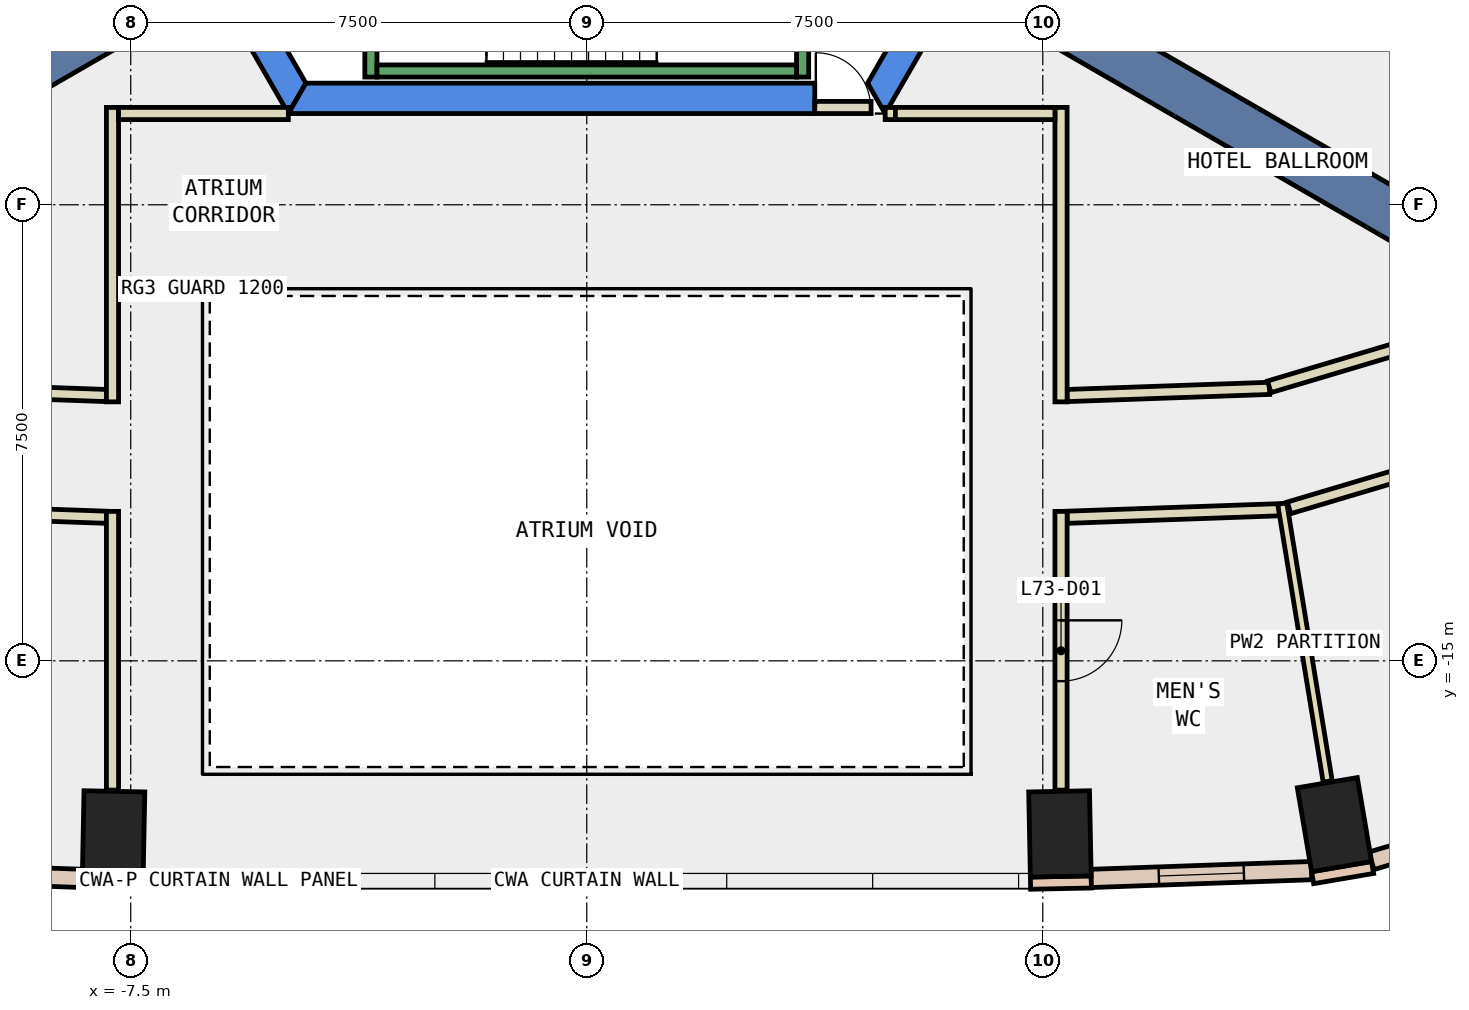
"""IFC4 building model, lengths in metres.
Left out: names, types, materials, properties, quantities, classifications, styles, units other than length and angle.
Written with IfcOpenShell. Run it as: python <this file> out.ifc"""

import sys

from ifc_helpers import new_model, si_unit, direction, frame, frame_2d, origin, origin_2d, place, context, subcontext, project, spatial, polyline, rectangle, outline, extrude, element, fill, save


model = new_model("IFC4")
c1 = context("Model", 3, precision=1e-05, world=origin(), true_north=direction((0.0, 1.0)))
c2 = subcontext(c1, "Body", "Model", "MODEL_VIEW")
j1 = project(units=[si_unit("LENGTHUNIT", "METRE"), si_unit("PLANEANGLEUNIT", "RADIAN")], contexts=[c1])
p1 = place(None, origin())
s1 = spatial("IfcSite", under=j1, at=p1, CompositionType="ELEMENT")
p2 = place(p1, origin())
s2 = spatial("IfcBuilding", under=s1, at=p2, CompositionType="ELEMENT")
p3 = place(p2, frame((0.0, 0.0, 311.6)))
s3 = spatial("IfcBuildingStorey", under=s2, at=p3, CompositionType="ELEMENT", Elevation=311.6)
for number, where, z_axis, x_axis in (
    (1, (-7.782, -17.846, -0.34), (0.0, 0.0, 1.0), (-1.0, 0.02, 0.0)),
    (2, (7.782, -17.846, -0.34), (0.0, 0.0, 1.0), (1.0, 0.02, 0.0)),
    (3, (12.297, -17.694, -0.34), (0.0, 0.0, 1.0), (0.986, 0.168, 0.0)),
):
    element("IfcColumn", number, at=place(p3, frame(where, z_axis=z_axis, x_axis=x_axis)), inside=s3, PredefinedType="COLUMN", context=c2, shape_type="SweptSolid", body=[
        extrude(rectangle(XDim=1.0, YDim=1.4, at=origin_2d()), origin(), (0.0, 0.0, 1.0), 3.6),
    ])
p4 = place(p3, frame((0.0, 0.0, -0.34)))
e4 = element("IfcWall", 4, at=p4, inside=s3, PredefinedType="SHEAR", context=c2, shape_type="SweptSolid", body=[
    extrude(outline(polyline([(-9.815, 2.5), (-4.907, -6.0), (-4.619, -5.5), (-9.238, 2.5), (-9.815, 2.5)])), origin(), (0.0, 0.0, 1.0), 3.6),
])
p5 = place(p3, frame((0.0, 0.0, -0.34)))
e5 = element("IfcWall", 5, at=p5, inside=s3, PredefinedType="SHEAR", context=c2, shape_type="SweptSolid", body=[
    extrude(outline(polyline([(3.75, -6.0), (3.75, -5.5), (-4.619, -5.5), (-4.907, -6.0), (3.75, -6.0)])), origin(), (0.0, 0.0, 1.0), 3.6),
])
p6 = place(p3, frame((0.0, 0.0, -0.34)))
e6 = element("IfcWall", 6, at=p6, inside=s3, PredefinedType="SHEAR", context=c2, shape_type="SweptSolid", body=[
    extrude(outline(polyline([(4.907, -6.0), (9.815, 2.5), (9.238, 2.5), (4.619, -5.5), (4.907, -6.0)])), origin(), (0.0, 0.0, 1.0), 3.6),
])
for number, where, z_axis, x_axis in (
    (7, (6.279, -3.625, -0.34), (0.0, 0.0, 1.0), (0.866, -0.5, 0.0)),
    (8, (-6.279, -3.625, -0.34), (0.0, 0.0, 1.0), (-0.866, -0.5, 0.0)),
):
    element("IfcWall", number, at=place(p3, frame(where, z_axis=z_axis, x_axis=x_axis)), inside=s3, PredefinedType="SHEAR", context=c2, shape_type="SweptSolid", body=[
        extrude(rectangle(XDim=9.0, YDim=0.8, at=frame_2d((4.5, 0.0))), origin(), (0.0, 0.0, 1.0), 3.6),
    ])
for number, where, z_axis, x_axis in (
    (9, (-8.298, -18.636, 0.0), (0.0, 0.0, 1.0), (1.0, -0.02, 0.0)),
    (10, (7.298, -18.656, 0.0), (0.0, 0.0, 1.0), (1.0, 0.02, 0.0)),
    (11, (11.938, -18.566, 0.0), (0.0, 0.0, 1.0), (0.986, 0.168, 0.0)),
):
    element("IfcWall", number, at=place(p3, frame(where, z_axis=z_axis, x_axis=x_axis)), inside=s3, PredefinedType="STANDARD", context=c2, shape_type="SweptSolid", body=[
        extrude(rectangle(XDim=1.0, YDim=0.2, at=frame_2d((0.5, 0.0))), origin(), (0.0, 0.0, 1.0), 3.26),
    ])
p7 = place(p3, frame((-11.919, -18.45, 0.0), z_axis=(0.0, 0.0, 1.0), x_axis=(0.999377185233, -0.035287981473, 0.0)))
e12 = element("IfcWall", 12, at=p7, inside=s3, PredefinedType="STANDARD", context=c2, shape_type="SweptSolid", body=[
    extrude(rectangle(XDim=3.625, YDim=0.3, at=frame_2d((1.812, 0.0))), origin(), (0.0, 0.0, 1.0), 3.26),
])
p8 = place(p7, frame((1.113, 0.0, 0.9)))
e13 = element("IfcOpeningElement", 13, at=p8, cuts=e12, PredefinedType="OPENING", context=c2, shape_type="SweptSolid", body=[
    extrude(rectangle(XDim=1.4, YDim=2.0, at=frame_2d((0.7, 1.0))), frame((0.0, 0.16, 0.0), z_axis=(0.0, -1.0, 0.0), x_axis=(1.0, 0.0, 0.0)), (0.0, 0.0, 1.0), 0.32),
])
p9 = place(p3, frame((8.296, -18.578, 0.0), z_axis=(0.0, 0.0, 1.0), x_axis=(0.999377185233, 0.035287981473, 0.0)))
e14 = element("IfcWall", 14, at=p9, inside=s3, PredefinedType="STANDARD", context=c2, shape_type="SweptSolid", body=[
    extrude(rectangle(XDim=3.625, YDim=0.3, at=frame_2d((1.812, 0.0))), origin(), (0.0, 0.0, 1.0), 3.26),
])
p10 = place(p9, frame((1.113, 0.0, 0.9)))
e15 = element("IfcOpeningElement", 15, at=p10, cuts=e14, PredefinedType="OPENING", context=c2, shape_type="SweptSolid", body=[
    extrude(rectangle(XDim=1.4, YDim=2.0, at=frame_2d((0.7, 1.0))), frame((0.0, 0.16, 0.0), z_axis=(0.0, -1.0, 0.0), x_axis=(1.0, 0.0, 0.0)), (0.0, 0.0, 1.0), 0.32),
])
p11 = place(p3, frame((12.904, -18.289, 0.0), z_axis=(0.0, 0.0, 1.0), x_axis=(0.95841929886, 0.285363711031, 0.0)))
e16 = element("IfcWall", 16, at=p11, inside=s3, PredefinedType="STANDARD", context=c2, shape_type="SweptSolid", body=[
    extrude(rectangle(XDim=4.777, YDim=0.3, at=frame_2d((2.388, 0.0))), origin(), (0.0, 0.0, 1.0), 3.26),
])
p12 = place(p11, frame((1.688, 0.0, 0.9)))
e17 = element("IfcOpeningElement", 17, at=p12, cuts=e16, PredefinedType="OPENING", context=c2, shape_type="SweptSolid", body=[
    extrude(rectangle(XDim=1.4, YDim=2.0, at=frame_2d((0.7, 1.0))), frame((0.0, 0.16, 0.0), z_axis=(0.0, -1.0, 0.0), x_axis=(1.0, 0.0, 0.0)), (0.0, 0.0, 1.0), 0.32),
])
p13 = place(p3, frame((7.9, -10.637, 0.0), z_axis=(0.0, 0.0, 1.0), x_axis=(0.999372900517, 0.035409119054, 0.0)))
e18 = element("IfcWall", 18, at=p13, inside=s3, PredefinedType="PARTITIONING", context=c2, shape_type="SweptSolid", body=[
    extrude(rectangle(XDim=3.33, YDim=0.2, at=frame_2d((1.665, 0.0))), origin(), (0.0, 0.0, 1.0), 3.26),
])
p14 = place(p3, frame((11.224, -10.494, 0.0), z_axis=(0.0, 0.0, 1.0), x_axis=(0.958417413979, 0.285370041492, 0.0)))
e19 = element("IfcWall", 19, at=p14, inside=s3, PredefinedType="PARTITIONING", context=c2, shape_type="SweptSolid", body=[
    extrude(rectangle(XDim=2.866, YDim=0.2, at=frame_2d((1.433, 0.0))), origin(), (0.0, 0.0, 1.0), 3.26),
])
p15 = place(p3, frame((14.549, -5.107, 0.0), z_axis=(0.0, 0.0, 1.0), x_axis=(-0.47449538478, 0.880257990491, 0.0)))
e20 = element("IfcWall", 20, at=p15, inside=s3, PredefinedType="PARTITIONING", context=c2, shape_type="SweptSolid", body=[
    extrude(rectangle(XDim=7.655, YDim=0.2, at=frame_2d((3.827, 0.0))), origin(), (0.0, 0.0, 1.0), 3.26),
])
p16 = place(p15, frame((2.927, 0.0, 0.0)))
e21 = element("IfcOpeningElement", 21, at=p16, cuts=e20, PredefinedType="OPENING", context=c2, shape_type="SweptSolid", body=[
    extrude(rectangle(XDim=1.8, YDim=2.1, at=frame_2d((0.9, 1.05))), frame((0.0, 0.11, 0.0), z_axis=(0.0, -1.0, 0.0), x_axis=(1.0, 0.0, 0.0)), (0.0, 0.0, 1.0), 0.22),
])
p17 = place(p3, frame((-11.228, -10.519, 0.0), z_axis=(0.0, 0.0, 1.0), x_axis=(0.999372900517, -0.035409119054, 0.0)))
e22 = element("IfcWall", 22, at=p17, inside=s3, PredefinedType="PARTITIONING", context=c2, shape_type="SweptSolid", body=[
    extrude(rectangle(XDim=3.33, YDim=0.2, at=frame_2d((1.665, 0.0))), origin(), (0.0, 0.0, 1.0), 3.26),
])
p18 = place(p3, frame((11.479, -12.512, 0.0), z_axis=(0.0, 0.0, 1.0), x_axis=(-0.999371508837, -0.035448375484, 0.0)))
e23 = element("IfcWall", 23, at=p18, inside=s3, PredefinedType="PARTITIONING", context=c2, shape_type="SweptSolid", body=[
    extrude(rectangle(XDim=3.581, YDim=0.2, at=frame_2d((1.791, 0.0))), origin(), (0.0, 0.0, 1.0), 3.26),
])
p19 = place(p3, frame((15.004, -11.456, 0.0), z_axis=(0.0, 0.0, 1.0), x_axis=(-0.958459796003, -0.285227662485, 0.0)))
e24 = element("IfcWall", 24, at=p19, inside=s3, PredefinedType="PARTITIONING", context=c2, shape_type="SweptSolid", body=[
    extrude(rectangle(XDim=3.604, YDim=0.2, at=frame_2d((1.802, 0.0))), origin(), (0.0, 0.0, 1.0), 3.26),
])
p20 = place(p3, frame((-7.9, -12.639, 0.0), z_axis=(0.0, 0.0, 1.0), x_axis=(-0.999368879246, 0.035522432268, 0.0)))
e25 = element("IfcWall", 25, at=p20, inside=s3, PredefinedType="PARTITIONING", context=c2, shape_type="SweptSolid", body=[
    extrude(rectangle(XDim=3.656, YDim=0.2, at=frame_2d((1.828, 0.0))), origin(), (0.0, 0.0, 1.0), 3.26),
])
p21 = place(p20, frame((1.328, 0.0, 0.0)))
e26 = element("IfcOpeningElement", 26, at=p21, cuts=e25, PredefinedType="OPENING", context=c2, shape_type="SweptSolid", body=[
    extrude(rectangle(XDim=1.0, YDim=2.1, at=frame_2d((0.5, 1.05))), frame((0.0, 0.11, 0.0), z_axis=(0.0, -1.0, 0.0), x_axis=(1.0, 0.0, 0.0)), (0.0, 0.0, 1.0), 0.22),
])
p22 = place(p3, frame((4.908, -5.999, 0.0), z_axis=(0.0, 0.0, 1.0), x_axis=(1.0, 0.0, 0.0)))
e27 = element("IfcWall", 27, at=p22, inside=s3, PredefinedType="PARTITIONING", context=c2, shape_type="SweptSolid", body=[
    extrude(rectangle(XDim=0.168, YDim=0.2, at=frame_2d((0.084, 0.0))), origin(), (0.0, 0.0, 1.0), 2.4),
])
for number, where, z_axis, x_axis in (
    (28, (7.8, -5.899, 0.0), (0.0, 0.0, 1.0), (0.0, -1.0, 0.0)),
    (29, (-7.8, -10.741, 0.0), (0.0, 0.0, 1.0), (0.0, 1.0, 0.0)),
):
    element("IfcWall", number, at=place(p3, frame(where, z_axis=z_axis, x_axis=x_axis)), inside=s3, PredefinedType="PARTITIONING", context=c2, shape_type="SweptSolid", body=[
        extrude(rectangle(XDim=4.842, YDim=0.2, at=frame_2d((2.421, 0.0))), origin(), (0.0, 0.0, 1.0), 3.26),
    ])
p23 = place(p3, frame((-7.7, -5.999, 0.0), z_axis=(0.0, 0.0, 1.0), x_axis=(1.0, 0.0, 0.0)))
e30 = element("IfcWall", 30, at=p23, inside=s3, PredefinedType="PARTITIONING", context=c2, shape_type="SweptSolid", body=[
    extrude(rectangle(XDim=2.792, YDim=0.2, at=frame_2d((1.396, 0.0))), origin(), (0.0, 0.0, 1.0), 3.26),
])
p24 = place(p3, frame((7.8, -12.542, 0.0), z_axis=(0.0, 0.0, 1.0), x_axis=(0.0, -1.0, 0.0)))
e31 = element("IfcWall", 31, at=p24, inside=s3, PredefinedType="PARTITIONING", context=c2, shape_type="SweptSolid", body=[
    extrude(rectangle(XDim=4.584, YDim=0.2, at=frame_2d((2.292, 0.0))), origin(), (0.0, 0.0, 1.0), 3.26),
])
p25 = place(p24, frame((1.792, 0.0, 0.0)))
e32 = element("IfcOpeningElement", 32, at=p25, cuts=e31, PredefinedType="OPENING", context=c2, shape_type="SweptSolid", body=[
    extrude(rectangle(XDim=1.0, YDim=2.1, at=frame_2d((0.5, 1.05))), frame((0.0, 0.11, 0.0), z_axis=(0.0, -1.0, 0.0), x_axis=(1.0, 0.0, 0.0)), (0.0, 0.0, 1.0), 0.22),
])
p26 = place(p3, frame((-7.8, -17.126, 0.0), z_axis=(0.0, 0.0, 1.0), x_axis=(0.0, 1.0, 0.0)))
e33 = element("IfcWall", 33, at=p26, inside=s3, PredefinedType="PARTITIONING", context=c2, shape_type="SweptSolid", body=[
    extrude(rectangle(XDim=4.584, YDim=0.2, at=frame_2d((2.292, 0.0))), origin(), (0.0, 0.0, 1.0), 3.26),
])
p27 = place(p3, frame((11.438, -12.414, 0.0), z_axis=(0.0, 0.0, 1.0), x_axis=(0.161576343941, -0.986860215572, 0.0)))
e34 = element("IfcWall", 34, at=p27, inside=s3, PredefinedType="PARTITIONING", context=c2, shape_type="SweptSolid", body=[
    extrude(rectangle(XDim=4.63, YDim=0.15, at=frame_2d((2.315, 0.0))), origin(), (0.0, 0.0, 1.0), 3.26),
])
p28 = place(p3, frame((3.75, -5.9, 0.0), z_axis=(0.0, 0.0, 1.0), x_axis=(1.0, 0.0, 0.0)))
e35 = element("IfcWall", 35, at=p28, inside=s3, PredefinedType="PARTITIONING", context=c2, shape_type="SweptSolid", body=[
    extrude(rectangle(XDim=0.926, YDim=0.2, at=frame_2d((0.463, 0.0))), origin(), (0.0, 0.0, 1.0), 2.4),
])
p29 = place(p28, frame((0.017, 0.0, 0.0)))
e36 = element("IfcOpeningElement", 36, at=p29, cuts=e35, PredefinedType="OPENING", context=c2, shape_type="SweptSolid", body=[
    extrude(rectangle(XDim=0.9, YDim=2.1, at=frame_2d((0.45, 1.05))), frame((0.0, 0.11, 0.0), z_axis=(0.0, -1.0, 0.0), x_axis=(1.0, 0.0, 0.0)), (0.0, 0.0, 1.0), 0.22),
])
p30 = place(p3, frame((5.076, -5.999, 0.0), z_axis=(0.0, 0.0, 1.0), x_axis=(1.0, 0.0, 0.0)))
e37 = element("IfcWall", 37, at=p30, inside=s3, PredefinedType="PARTITIONING", context=c2, shape_type="SweptSolid", body=[
    extrude(rectangle(XDim=2.624, YDim=0.2, at=frame_2d((1.312, 0.0))), origin(), (0.0, 0.0, 1.0), 3.26),
])
p31 = place(p3, frame((-3.55, -1.0, 0.0), z_axis=(0.0, 0.0, 1.0), x_axis=(0.0, -1.0, 0.0)))
e38 = element("IfcWall", 38, at=p31, inside=s3, PredefinedType="STANDARD", context=c2, shape_type="SweptSolid", body=[
    extrude(rectangle(XDim=4.4, YDim=0.2, at=frame_2d((2.2, 0.0))), origin(), (0.0, 0.0, 1.0), 3.26),
])
p32 = place(p31, frame((2.4, 0.0, 0.0)))
e39 = element("IfcOpeningElement", 39, at=p32, cuts=e38, PredefinedType="OPENING", context=c2, shape_type="SweptSolid", body=[
    extrude(rectangle(XDim=1.1, YDim=2.2, at=frame_2d((0.55, 1.1))), frame((0.0, 0.11, 0.0), z_axis=(0.0, -1.0, 0.0), x_axis=(1.0, 0.0, 0.0)), (0.0, 0.0, 1.0), 0.22),
])
p33 = place(p3, frame((3.55, -2.667, 0.0), z_axis=(0.0, 0.0, 1.0), x_axis=(0.0, -1.0, 0.0)))
e40 = element("IfcWall", 40, at=p33, inside=s3, PredefinedType="STANDARD", context=c2, shape_type="SweptSolid", body=[
    extrude(rectangle(XDim=2.733, YDim=0.2, at=frame_2d((1.366, 0.0))), origin(), (0.0, 0.0, 1.0), 3.26),
])
p34 = place(p3, frame((-3.45, -5.3, 0.0), z_axis=(0.0, 0.0, 1.0), x_axis=(1.0, 0.0, 0.0)))
e41 = element("IfcWall", 41, at=p34, inside=s3, PredefinedType="STANDARD", context=c2, shape_type="SweptSolid", body=[
    extrude(rectangle(XDim=6.9, YDim=0.2, at=frame_2d((3.45, 0.0))), origin(), (0.0, 0.0, 1.0), 3.26),
])
p35 = place(p10, origin())
e42 = element("IfcWindow", 42, at=p35, inside=s3, PartitioningType="SINGLE_PANEL", PredefinedType="WINDOW", context=c2, shape_type="SweptSolid", body=[
    extrude(rectangle(XDim=1.4, YDim=2.0, at=frame_2d((0.7, 1.0))), frame((0.0, 0.03, 0.0), z_axis=(0.0, -1.0, 0.0), x_axis=(1.0, 0.0, 0.0)), (0.0, 0.0, 1.0), 0.06),
])
fill(e15, e42)
p36 = place(p25, origin())
e43 = element("IfcDoor", 43, at=p36, inside=s3, OperationType="SINGLE_SWING_LEFT", PredefinedType="DOOR", context=c2, shape_type="SweptSolid", body=[
    extrude(rectangle(XDim=1.0, YDim=2.1, at=frame_2d((0.5, 1.05))), frame((0.0, 0.025, 0.0), z_axis=(0.0, -1.0, 0.0), x_axis=(1.0, 0.0, 0.0)), (0.0, 0.0, 1.0), 0.05),
])
fill(e32, e43)
p37 = place(p29, origin())
e44 = element("IfcDoor", 44, at=p37, inside=s3, OperationType="SINGLE_SWING_LEFT", PredefinedType="DOOR", context=c2, shape_type="SweptSolid", body=[
    extrude(rectangle(XDim=0.9, YDim=2.1, at=frame_2d((0.45, 1.05))), frame((0.0, 0.025, 0.0), z_axis=(0.0, -1.0, 0.0), x_axis=(1.0, 0.0, 0.0)), (0.0, 0.0, 1.0), 0.05),
])
fill(e36, e44)
save(model, sys.argv[1])
